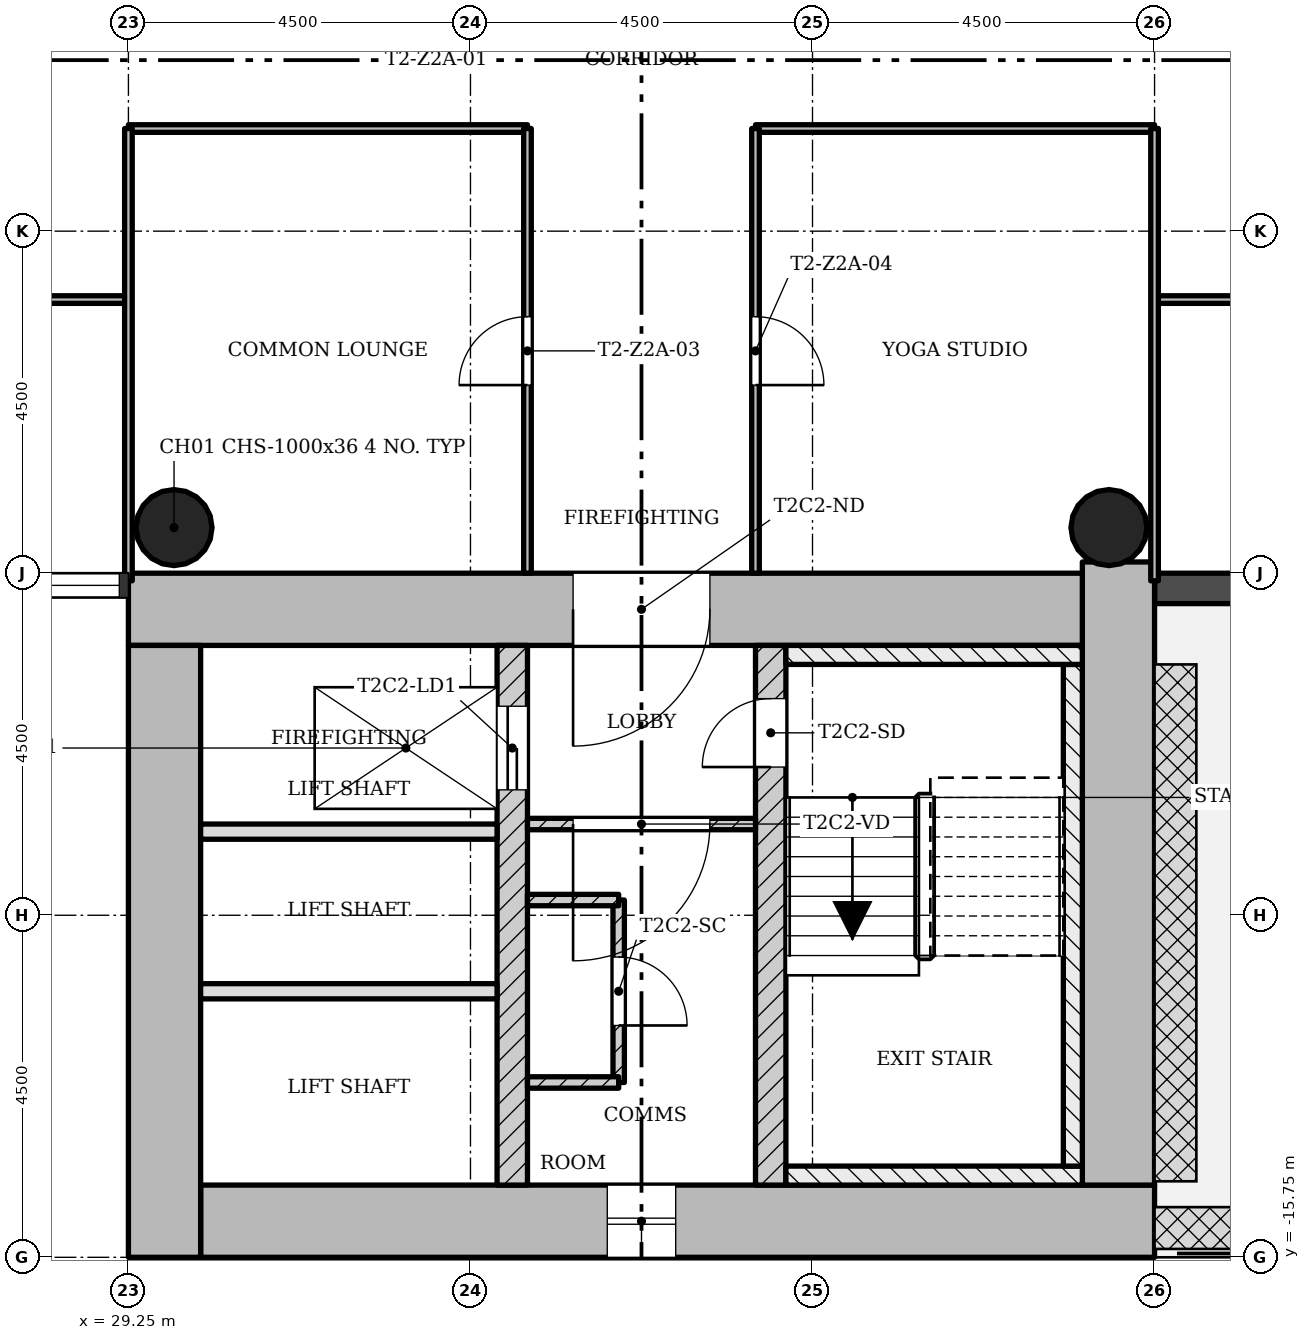
"""IFC4 building model, lengths in metres.
Left out: names, types, materials, properties, quantities, classifications, styles, units other than length and angle.
Written with IfcOpenShell. Run it as: python <this file> out.ifc"""

import sys

from ifc_helpers import new_model, si_unit, direction, frame, frame_2d, origin, origin_2d, place, context, subcontext, project, spatial, rectangle, hollow_circle, extrude, element, fill, save


model = new_model("IFC4")
c1 = context("Model", 3, precision=1e-05, world=origin(), true_north=direction((0.0, 1.0)))
c2 = subcontext(c1, "Body", "Model", "MODEL_VIEW")
j1 = project(units=[si_unit("LENGTHUNIT", "METRE"), si_unit("PLANEANGLEUNIT", "RADIAN")], contexts=[c1])
p1 = place(None, origin())
s1 = spatial("IfcSite", under=j1, at=p1, CompositionType="ELEMENT")
p2 = place(p1, origin())
s2 = spatial("IfcBuilding", under=s1, at=p2, CompositionType="ELEMENT")
p3 = place(p2, frame((0.0, 0.0, 117.4)))
s3 = spatial("IfcBuildingStorey", under=s2, at=p3, CompositionType="ELEMENT", Elevation=117.4)
p4 = place(p3, frame((30.2, -15.275, 0.0), z_axis=(0.0, 0.0, 1.0), x_axis=(1.0, 0.0, 0.0)))
e1 = element("IfcWall", 1, at=p4, inside=s3, PredefinedType="SHEAR", context=c2, shape_type="SweptSolid", body=[
    extrude(rectangle(XDim=12.55, YDim=0.95, at=frame_2d((6.275, 0.0))), origin(), (0.0, 0.0, 1.0), 3.4),
])
p5 = place(p4, frame((5.35, 0.0, 0.45)))
e2 = element("IfcOpeningElement", 2, at=p5, cuts=e1, PredefinedType="OPENING", context=c2, shape_type="SweptSolid", body=[
    extrude(rectangle(XDim=0.9, YDim=2.4, at=frame_2d((0.45, 1.2))), frame((0.0, 0.485, 0.0), z_axis=(0.0, -1.0, 0.0), x_axis=(1.0, 0.0, 0.0)), (0.0, 0.0, 1.0), 0.97),
])
p6 = place(p3, frame((42.275, -14.8, 0.0), z_axis=(0.0, 0.0, 1.0), x_axis=(0.0, 1.0, 0.0)))
e3 = element("IfcWall", 3, at=p6, inside=s3, PredefinedType="SHEAR", context=c2, shape_type="SweptSolid", body=[
    extrude(rectangle(XDim=8.198, YDim=0.95, at=frame_2d((4.099, 0.0))), origin(), (0.0, 0.0, 1.0), 3.4),
])
p7 = place(p3, frame((41.8, -7.225, 0.0), z_axis=(0.0, 0.0, 1.0), x_axis=(-1.0, 0.0, 0.0)))
e4 = element("IfcWall", 4, at=p7, inside=s3, PredefinedType="SHEAR", context=c2, shape_type="SweptSolid", body=[
    extrude(rectangle(XDim=12.55, YDim=0.95, at=frame_2d((6.275, 0.0))), origin(), (0.0, 0.0, 1.0), 3.4),
])
p8 = place(p7, frame((4.9, 0.0, 0.0)))
e5 = element("IfcOpeningElement", 5, at=p8, cuts=e4, PredefinedType="OPENING", context=c2, shape_type="SweptSolid", body=[
    extrude(rectangle(XDim=1.8, YDim=2.1, at=frame_2d((0.9, 1.05))), frame((0.0, 0.485, 0.0), z_axis=(0.0, -1.0, 0.0), x_axis=(1.0, 0.0, 0.0)), (0.0, 0.0, 1.0), 0.97),
])
p9 = place(p3, frame((29.725, -7.7, 0.0), z_axis=(0.0, 0.0, 1.0), x_axis=(0.0, -1.0, 0.0)))
e6 = element("IfcWall", 6, at=p9, inside=s3, PredefinedType="SHEAR", context=c2, shape_type="SweptSolid", body=[
    extrude(rectangle(XDim=8.05, YDim=0.95, at=frame_2d((4.025, 0.0))), origin(), (0.0, 0.0, 1.0), 3.4),
])
p10 = place(p3, frame((34.3, -14.8, 0.0), z_axis=(0.0, 0.0, 1.0), x_axis=(0.0, 1.0, 0.0)))
e7 = element("IfcWall", 7, at=p10, inside=s3, PredefinedType="SHEAR", context=c2, shape_type="SweptSolid", body=[
    extrude(rectangle(XDim=7.1, YDim=0.4, at=frame_2d((3.55, 0.0))), origin(), (0.0, 0.0, 1.0), 3.4),
])
p11 = place(p10, frame((5.2, 0.0, 0.0)))
e8 = element("IfcOpeningElement", 8, at=p11, cuts=e7, PredefinedType="OPENING", context=c2, shape_type="SweptSolid", body=[
    extrude(rectangle(XDim=1.1, YDim=2.1, at=frame_2d((0.55, 1.05))), frame((0.0, 0.21, 0.0), z_axis=(0.0, -1.0, 0.0), x_axis=(1.0, 0.0, 0.0)), (0.0, 0.0, 1.0), 0.42),
])
p12 = place(p3, frame((37.7, -14.8, 0.0), z_axis=(0.0, 0.0, 1.0), x_axis=(0.0, 1.0, 0.0)))
e9 = element("IfcWall", 9, at=p12, inside=s3, PredefinedType="SHEAR", context=c2, shape_type="SweptSolid", body=[
    extrude(rectangle(XDim=7.1, YDim=0.4, at=frame_2d((3.55, 0.0))), origin(), (0.0, 0.0, 1.0), 3.4),
])
p13 = place(p12, frame((5.5, 0.0, 0.0)))
e10 = element("IfcOpeningElement", 10, at=p13, cuts=e9, PredefinedType="OPENING", context=c2, shape_type="SweptSolid", body=[
    extrude(rectangle(XDim=0.9, YDim=2.1, at=frame_2d((0.45, 1.05))), frame((0.0, 0.21, 0.0), z_axis=(0.0, -1.0, 0.0), x_axis=(1.0, 0.0, 0.0)), (0.0, 0.0, 1.0), 0.42),
])
for number, where, z_axis, x_axis in (
    (11, (42.15, -6.15, 0.0), (0.0, 0.0, 1.0), (1.0, 0.0, 0.0)),
    (12, (29.85, -6.15, 0.0), (0.0, 0.0, 1.0), (1.0, 0.0, 0.0)),
):
    element("IfcColumn", number, at=place(p3, frame(where, z_axis=z_axis, x_axis=x_axis)), inside=s3, PredefinedType="COLUMN", context=c2, shape_type="SweptSolid", body=[
        extrude(hollow_circle(Radius=0.5, WallThickness=0.036, at=origin_2d()), origin(), (0.0, 0.0, 1.0), 3.4),
    ])
p14 = place(p3, frame((42.75, -6.95, -0.02), z_axis=(0.0, 0.0, 1.0), x_axis=(1.0, 0.0, 0.0)))
e13 = element("IfcWall", 13, at=p14, inside=s3, PredefinedType="STANDARD", context=c2, shape_type="SweptSolid", body=[
    extrude(rectangle(XDim=4.5, YDim=0.4, at=frame_2d((2.25, 0.0))), origin(), (0.0, 0.0, 1.0), 3.12),
])
p15 = place(p14, frame((1.35, 0.0, 0.02)))
e14 = element("IfcOpeningElement", 14, at=p15, cuts=e13, PredefinedType="OPENING", context=c2, shape_type="SweptSolid", body=[
    extrude(rectangle(XDim=1.8, YDim=2.1, at=frame_2d((0.9, 1.05))), frame((0.0, 0.21, 0.0), z_axis=(0.0, -1.0, 0.0), x_axis=(1.0, 0.0, 0.0)), (0.0, 0.0, 1.0), 0.42),
])
p16 = place(p3, frame((34.5, -10.05, 0.0), z_axis=(0.0, 0.0, 1.0), x_axis=(1.0, 0.0, 0.0)))
e15 = element("IfcWall", 15, at=p16, inside=s3, PredefinedType="PARTITIONING", context=c2, shape_type="SweptSolid", body=[
    extrude(rectangle(XDim=3.0, YDim=0.15, at=frame_2d((1.5, 0.0))), origin(), (0.0, 0.0, 1.0), 3.0),
])
p17 = place(p16, frame((0.6, 0.0, 0.0)))
e16 = element("IfcOpeningElement", 16, at=p17, cuts=e15, PredefinedType="OPENING", context=c2, shape_type="SweptSolid", body=[
    extrude(rectangle(XDim=1.8, YDim=2.1, at=frame_2d((0.9, 1.05))), frame((0.0, 0.085, 0.0), z_axis=(0.0, -1.0, 0.0), x_axis=(1.0, 0.0, 0.0)), (0.0, 0.0, 1.0), 0.17),
])
for number, where, z_axis, x_axis in (
    (17, (30.2, -10.15, 0.0), (0.0, 0.0, 1.0), (1.0, 0.0, 0.0)),
    (18, (30.2, -12.25, 0.0), (0.0, 0.0, 1.0), (1.0, 0.0, 0.0)),
):
    element("IfcWall", number, at=place(p3, frame(where, z_axis=z_axis, x_axis=x_axis)), inside=s3, PredefinedType="SOLIDWALL", context=c2, shape_type="SweptSolid", body=[
        extrude(rectangle(XDim=3.9, YDim=0.2, at=frame_2d((1.95, 0.0))), origin(), (0.0, 0.0, 1.0), 3.0),
    ])
p18 = place(p3, frame((35.7, -11.05, 0.0), z_axis=(0.0, 0.0, 1.0), x_axis=(0.0, -1.0, 0.0)))
e19 = element("IfcWall", 19, at=p18, inside=s3, PredefinedType="PARTITIONING", context=c2, shape_type="SweptSolid", body=[
    extrude(rectangle(XDim=2.4, YDim=0.15, at=frame_2d((1.2, 0.0))), origin(), (0.0, 0.0, 1.0), 3.0),
])
p19 = place(p18, frame((0.75, 0.0, 0.0)))
e20 = element("IfcOpeningElement", 20, at=p19, cuts=e19, PredefinedType="OPENING", context=c2, shape_type="SweptSolid", body=[
    extrude(rectangle(XDim=0.9, YDim=2.1, at=frame_2d((0.45, 1.05))), frame((0.0, 0.085, 0.0), z_axis=(0.0, -1.0, 0.0), x_axis=(1.0, 0.0, 0.0)), (0.0, 0.0, 1.0), 0.17),
])
for number, where, z_axis, x_axis in (
    (21, (35.7, -11.05, 0.0), (0.0, 0.0, 1.0), (-1.0, 0.0, 0.0)),
    (22, (35.7, -13.45, 0.0), (0.0, 0.0, 1.0), (-1.0, 0.0, 0.0)),
):
    element("IfcWall", number, at=place(p3, frame(where, z_axis=z_axis, x_axis=x_axis)), inside=s3, PredefinedType="PARTITIONING", context=c2, shape_type="SweptSolid", body=[
        extrude(rectangle(XDim=1.2, YDim=0.15, at=frame_2d((0.6, 0.0))), origin(), (0.0, 0.0, 1.0), 3.0),
    ])
p20 = place(p3, frame((51.75, -3.15, 0.0), z_axis=(0.0, 0.0, 1.0), x_axis=(-1.0, 0.0, 0.0)))
e23 = element("IfcWall", 23, at=p20, inside=s3, PredefinedType="PARTITIONING", context=c2, shape_type="SweptSolid", body=[
    extrude(rectangle(XDim=9.0, YDim=0.1, at=frame_2d((4.5, 0.0))), origin(), (0.0, 0.0, 1.0), 3.0),
])
p21 = place(p20, frame((5.55, 0.0, 0.0)))
e24 = element("IfcOpeningElement", 24, at=p21, cuts=e23, PredefinedType="OPENING", context=c2, shape_type="SweptSolid", body=[
    extrude(rectangle(XDim=0.9, YDim=2.1, at=frame_2d((0.45, 1.05))), frame((0.0, 0.06, 0.0), z_axis=(0.0, -1.0, 0.0), x_axis=(1.0, 0.0, 0.0)), (0.0, 0.0, 1.0), 0.12),
])
p22 = place(p3, frame((29.25, -3.15, 0.0), z_axis=(0.0, 0.0, 1.0), x_axis=(-1.0, 0.0, 0.0)))
e25 = element("IfcWall", 25, at=p22, inside=s3, PredefinedType="PARTITIONING", context=c2, shape_type="SweptSolid", body=[
    extrude(rectangle(XDim=9.0, YDim=0.1, at=frame_2d((4.5, 0.0))), origin(), (0.0, 0.0, 1.0), 3.0),
])
p23 = place(p22, frame((2.55, 0.0, 0.0)))
e26 = element("IfcOpeningElement", 26, at=p23, cuts=e25, PredefinedType="OPENING", context=c2, shape_type="SweptSolid", body=[
    extrude(rectangle(XDim=0.9, YDim=2.1, at=frame_2d((0.45, 1.05))), frame((0.0, 0.06, 0.0), z_axis=(0.0, -1.0, 0.0), x_axis=(1.0, 0.0, 0.0)), (0.0, 0.0, 1.0), 0.12),
])
for number, where, z_axis, x_axis in (
    (27, (42.75, -0.9, 0.0), (0.0, 0.0, 1.0), (-1.0, 0.0, 0.0)),
    (28, (34.5, -0.9, 0.0), (0.0, 0.0, 1.0), (-1.0, 0.0, 0.0)),
):
    element("IfcWall", number, at=place(p3, frame(where, z_axis=z_axis, x_axis=x_axis)), inside=s3, PredefinedType="PARTITIONING", context=c2, shape_type="SweptSolid", body=[
        extrude(rectangle(XDim=5.25, YDim=0.1, at=frame_2d((2.625, 0.0))), origin(), (0.0, 0.0, 1.0), 3.0),
    ])
p24 = place(p3, frame((42.75, -6.85, 0.0), z_axis=(0.0, 0.0, 1.0), x_axis=(0.0, 1.0, 0.0)))
e29 = element("IfcWall", 29, at=p24, inside=s3, PredefinedType="PARTITIONING", context=c2, shape_type="SweptSolid", body=[
    extrude(rectangle(XDim=5.95, YDim=0.1, at=frame_2d((2.975, 0.0))), origin(), (0.0, 0.0, 1.0), 3.0),
])
p25 = place(p3, frame((37.5, -6.75, 0.0), z_axis=(0.0, 0.0, 1.0), x_axis=(0.0, 1.0, 0.0)))
e30 = element("IfcWall", 30, at=p25, inside=s3, PredefinedType="PARTITIONING", context=c2, shape_type="SweptSolid", body=[
    extrude(rectangle(XDim=5.85, YDim=0.1, at=frame_2d((2.925, 0.0))), origin(), (0.0, 0.0, 1.0), 3.0),
])
p26 = place(p25, frame((2.475, 0.0, 0.0)))
e31 = element("IfcOpeningElement", 31, at=p26, cuts=e30, PredefinedType="OPENING", context=c2, shape_type="SweptSolid", body=[
    extrude(rectangle(XDim=0.9, YDim=2.1, at=frame_2d((0.45, 1.05))), frame((0.0, 0.06, 0.0), z_axis=(0.0, -1.0, 0.0), x_axis=(1.0, 0.0, 0.0)), (0.0, 0.0, 1.0), 0.12),
])
p27 = place(p3, frame((34.5, -6.75, 0.0), z_axis=(0.0, 0.0, 1.0), x_axis=(0.0, 1.0, 0.0)))
e32 = element("IfcWall", 32, at=p27, inside=s3, PredefinedType="PARTITIONING", context=c2, shape_type="SweptSolid", body=[
    extrude(rectangle(XDim=5.85, YDim=0.1, at=frame_2d((2.925, 0.0))), origin(), (0.0, 0.0, 1.0), 3.0),
])
p28 = place(p27, frame((2.475, 0.0, 0.0)))
e33 = element("IfcOpeningElement", 33, at=p28, cuts=e32, PredefinedType="OPENING", context=c2, shape_type="SweptSolid", body=[
    extrude(rectangle(XDim=0.9, YDim=2.1, at=frame_2d((0.45, 1.05))), frame((0.0, 0.06, 0.0), z_axis=(0.0, -1.0, 0.0), x_axis=(1.0, 0.0, 0.0)), (0.0, 0.0, 1.0), 0.12),
])
p29 = place(p3, frame((29.25, -6.85, 0.0), z_axis=(0.0, 0.0, 1.0), x_axis=(0.0, 1.0, 0.0)))
e34 = element("IfcWall", 34, at=p29, inside=s3, PredefinedType="PARTITIONING", context=c2, shape_type="SweptSolid", body=[
    extrude(rectangle(XDim=5.95, YDim=0.1, at=frame_2d((2.975, 0.0))), origin(), (0.0, 0.0, 1.0), 3.0),
])
p30 = place(p3, frame((37.9, -14.675, 0.0), z_axis=(0.0, 0.0, 1.0), x_axis=(1.0, 0.0, 0.0)))
e35 = element("IfcWall", 35, at=p30, inside=s3, PredefinedType="SHEAR", context=c2, shape_type="SweptSolid", body=[
    extrude(rectangle(XDim=3.9, YDim=0.25, at=frame_2d((1.95, 0.0))), origin(), (0.0, 0.0, 1.0), 3.4),
])
p31 = place(p3, frame((41.675, -7.95, 0.0), z_axis=(0.0, 0.0, 1.0), x_axis=(0.0, -1.0, 0.0)))
e36 = element("IfcWall", 36, at=p31, inside=s3, PredefinedType="SHEAR", context=c2, shape_type="SweptSolid", body=[
    extrude(rectangle(XDim=6.6, YDim=0.25, at=frame_2d((3.3, 0.0))), origin(), (0.0, 0.0, 1.0), 3.4),
])
p32 = place(p3, frame((37.9, -7.825, 0.0), z_axis=(0.0, 0.0, 1.0), x_axis=(1.0, 0.0, 0.0)))
e37 = element("IfcWall", 37, at=p32, inside=s3, PredefinedType="SHEAR", context=c2, shape_type="SweptSolid", body=[
    extrude(rectangle(XDim=3.9, YDim=0.25, at=frame_2d((1.95, 0.0))), origin(), (0.0, 0.0, 1.0), 3.4),
])
p33 = place(p5, origin())
e38 = element("IfcWindow", 38, at=p33, inside=s3, PartitioningType="SINGLE_PANEL", PredefinedType="WINDOW", context=c2, shape_type="SweptSolid", body=[
    extrude(rectangle(XDim=0.9, YDim=2.4, at=frame_2d((0.45, 1.2))), frame((0.0, 0.03, 0.0), z_axis=(0.0, -1.0, 0.0), x_axis=(1.0, 0.0, 0.0)), (0.0, 0.0, 1.0), 0.06),
])
fill(e2, e38)
p34 = place(p17, origin())
e39 = element("IfcDoor", 39, at=p34, inside=s3, OperationType="SINGLE_SWING_LEFT", PredefinedType="DOOR", context=c2, shape_type="SweptSolid", body=[
    extrude(rectangle(XDim=1.8, YDim=2.1, at=frame_2d((0.9, 1.05))), frame((0.0, 0.025, 0.0), z_axis=(0.0, -1.0, 0.0), x_axis=(1.0, 0.0, 0.0)), (0.0, 0.0, 1.0), 0.05),
])
fill(e16, e39)
p35 = place(p19, origin())
e40 = element("IfcDoor", 40, at=p35, inside=s3, OperationType="SINGLE_SWING_LEFT", PredefinedType="DOOR", context=c2, shape_type="SweptSolid", body=[
    extrude(rectangle(XDim=0.9, YDim=2.1, at=frame_2d((0.45, 1.05))), frame((0.0, 0.025, 0.0), z_axis=(0.0, -1.0, 0.0), x_axis=(1.0, 0.0, 0.0)), (0.0, 0.0, 1.0), 0.05),
])
fill(e20, e40)
p36 = place(p28, origin())
e41 = element("IfcDoor", 41, at=p36, inside=s3, OperationType="SINGLE_SWING_RIGHT", PredefinedType="DOOR", context=c2, shape_type="SweptSolid", body=[
    extrude(rectangle(XDim=0.9, YDim=2.1, at=frame_2d((0.45, 1.05))), frame((0.0, 0.025, 0.0), z_axis=(0.0, -1.0, 0.0), x_axis=(1.0, 0.0, 0.0)), (0.0, 0.0, 1.0), 0.05),
])
fill(e33, e41)
p37 = place(p26, origin())
e42 = element("IfcDoor", 42, at=p37, inside=s3, OperationType="SINGLE_SWING_LEFT", PredefinedType="DOOR", context=c2, shape_type="SweptSolid", body=[
    extrude(rectangle(XDim=0.9, YDim=2.1, at=frame_2d((0.45, 1.05))), frame((0.0, 0.025, 0.0), z_axis=(0.0, -1.0, 0.0), x_axis=(1.0, 0.0, 0.0)), (0.0, 0.0, 1.0), 0.05),
])
fill(e31, e42)
p38 = place(p13, origin())
e43 = element("IfcDoor", 43, at=p38, inside=s3, OperationType="SINGLE_SWING_RIGHT", PredefinedType="DOOR", context=c2, shape_type="SweptSolid", body=[
    extrude(rectangle(XDim=0.9, YDim=2.1, at=frame_2d((0.45, 1.05))), frame((0.0, 0.025, 0.0), z_axis=(0.0, -1.0, 0.0), x_axis=(1.0, 0.0, 0.0)), (0.0, 0.0, 1.0), 0.05),
])
fill(e10, e43)
p39 = place(p11, origin())
e44 = element("IfcDoor", 44, at=p39, inside=s3, OperationType="SLIDING_TO_LEFT", PredefinedType="DOOR", context=c2, shape_type="SweptSolid", body=[
    extrude(rectangle(XDim=1.1, YDim=2.1, at=frame_2d((0.55, 1.05))), frame((0.0, 0.025, 0.0), z_axis=(0.0, -1.0, 0.0), x_axis=(1.0, 0.0, 0.0)), (0.0, 0.0, 1.0), 0.05),
])
fill(e8, e44)
p40 = place(p8, origin())
e45 = element("IfcDoor", 45, at=p40, inside=s3, OperationType="SINGLE_SWING_LEFT", PredefinedType="DOOR", context=c2, shape_type="SweptSolid", body=[
    extrude(rectangle(XDim=1.8, YDim=2.1, at=frame_2d((0.9, 1.05))), frame((0.0, 0.025, 0.0), z_axis=(0.0, -1.0, 0.0), x_axis=(1.0, 0.0, 0.0)), (0.0, 0.0, 1.0), 0.05),
])
fill(e5, e45)
save(model, sys.argv[1])
